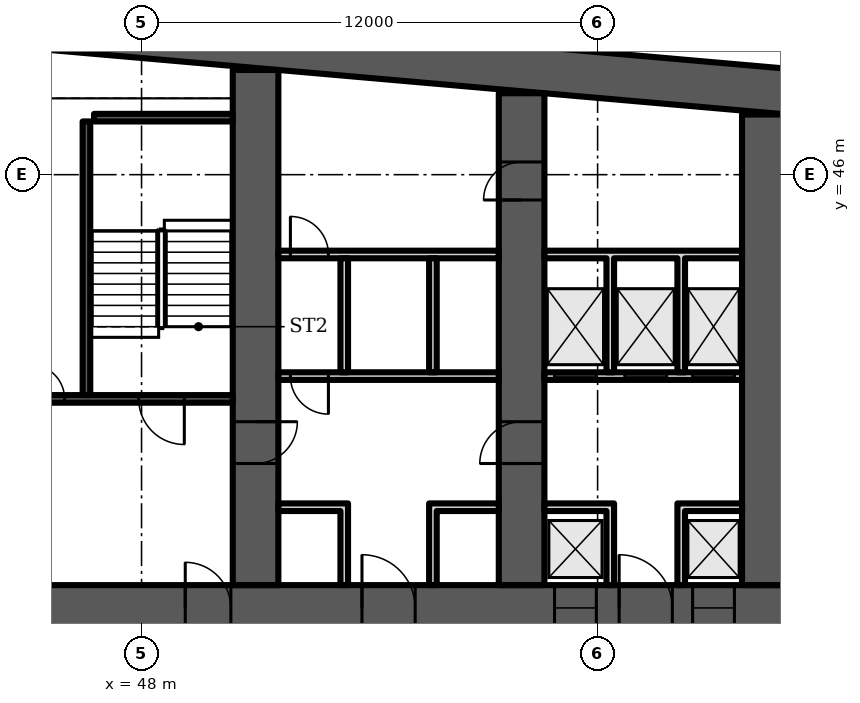
"""IFC4 building model, lengths in metres.
Left out: names, types, materials, properties, quantities, classifications, styles, units other than length and angle.
Written with IfcOpenShell. Run it as: python <this file> out.ifc"""

import sys

from ifc_helpers import new_model, si_unit, direction, frame, frame_2d, origin, place, context, subcontext, project, spatial, polyline, rectangle, outline, extrude, element, fill, save


model = new_model("IFC4")
c1 = context("Model", 3, precision=1e-05, world=origin(), true_north=direction((0.0, 1.0)))
c2 = subcontext(c1, "Body", "Model", "MODEL_VIEW")
j1 = project(units=[si_unit("LENGTHUNIT", "METRE"), si_unit("PLANEANGLEUNIT", "RADIAN")], contexts=[c1])
p1 = place(None, origin())
s1 = spatial("IfcSite", under=j1, at=p1, CompositionType="ELEMENT")
p2 = place(p1, origin())
s2 = spatial("IfcBuilding", under=s1, at=p2, CompositionType="ELEMENT")
p3 = place(p2, frame((0.0, 0.0, 63.1)))
s3 = spatial("IfcBuildingStorey", under=s2, at=p3, CompositionType="ELEMENT", Elevation=63.1)
p4 = place(p3, frame((0.0, 0.0, -0.0)))
e1 = element("IfcWall", 1, at=p4, inside=s3, PredefinedType="SHEAR", context=c2, shape_type="SweptSolid", body=[
    extrude(outline(polyline([(9.0, 47.583), (37.0, 50.032), (65.0, 47.583), (65.0, 48.787), (37.0, 51.237), (9.0, 48.787), (9.0, 47.583)])), origin(), (0.0, 0.0, 1.0), 3.6),
])
p5 = place(p3, frame((9.0, 34.6, 0.0), z_axis=(0.0, 0.0, 1.0), x_axis=(1.0, 0.0, 0.0)))
e2 = element("IfcWall", 2, at=p5, inside=s3, PredefinedType="SHEAR", context=c2, shape_type="SweptSolid", body=[
    extrude(rectangle(XDim=56.0, YDim=1.2, at=frame_2d((28.0, 0.0))), origin(), (0.0, 0.0, 1.0), 3.6),
])
p6 = place(p5, frame((3.3, 0.0, 0.0)))
e3 = element("IfcOpeningElement", 3, at=p6, cuts=e2, PredefinedType="OPENING", context=c2, shape_type="SweptSolid", body=[
    extrude(rectangle(XDim=1.0, YDim=2.1, at=frame_2d((0.5, 1.05))), frame((0.0, 0.61, 0.0), z_axis=(0.0, -1.0, 0.0), x_axis=(1.0, 0.0, 0.0)), (0.0, 0.0, 1.0), 1.22),
])
p7 = place(p5, frame((7.867, 0.0, 0.0)))
e4 = element("IfcOpeningElement", 4, at=p7, cuts=e2, PredefinedType="OPENING", context=c2, shape_type="SweptSolid", body=[
    extrude(rectangle(XDim=1.1, YDim=2.1, at=frame_2d((0.55, 1.05))), frame((0.0, 0.61, 0.0), z_axis=(0.0, -1.0, 0.0), x_axis=(1.0, 0.0, 0.0)), (0.0, 0.0, 1.0), 1.22),
])
p8 = place(p5, frame((12.033, 0.0, 0.0)))
e5 = element("IfcOpeningElement", 5, at=p8, cuts=e2, PredefinedType="OPENING", context=c2, shape_type="SweptSolid", body=[
    extrude(rectangle(XDim=1.1, YDim=2.1, at=frame_2d((0.55, 1.05))), frame((0.0, 0.61, 0.0), z_axis=(0.0, -1.0, 0.0), x_axis=(1.0, 0.0, 0.0)), (0.0, 0.0, 1.0), 1.22),
])
p9 = place(p5, frame((9.8, 0.0, 0.0)))
e6 = element("IfcOpeningElement", 6, at=p9, cuts=e2, PredefinedType="OPENING", context=c2, shape_type="SweptSolid", body=[
    extrude(rectangle(XDim=1.4, YDim=2.1, at=frame_2d((0.7, 1.05))), frame((0.0, 0.61, 0.0), z_axis=(0.0, -1.0, 0.0), x_axis=(1.0, 0.0, 0.0)), (0.0, 0.0, 1.0), 1.22),
])
p10 = place(p5, frame((14.65, 0.0, 0.0)))
e7 = element("IfcOpeningElement", 7, at=p10, cuts=e2, PredefinedType="OPENING", context=c2, shape_type="SweptSolid", body=[
    extrude(rectangle(XDim=1.2, YDim=2.1, at=frame_2d((0.6, 1.05))), frame((0.0, 0.61, 0.0), z_axis=(0.0, -1.0, 0.0), x_axis=(1.0, 0.0, 0.0)), (0.0, 0.0, 1.0), 1.22),
])
p11 = place(p5, frame((21.867, 0.0, 0.0)))
e8 = element("IfcOpeningElement", 8, at=p11, cuts=e2, PredefinedType="OPENING", context=c2, shape_type="SweptSolid", body=[
    extrude(rectangle(XDim=1.1, YDim=2.1, at=frame_2d((0.55, 1.05))), frame((0.0, 0.61, 0.0), z_axis=(0.0, -1.0, 0.0), x_axis=(1.0, 0.0, 0.0)), (0.0, 0.0, 1.0), 1.22),
])
p12 = place(p5, frame((26.033, 0.0, 0.0)))
e9 = element("IfcOpeningElement", 9, at=p12, cuts=e2, PredefinedType="OPENING", context=c2, shape_type="SweptSolid", body=[
    extrude(rectangle(XDim=1.1, YDim=2.1, at=frame_2d((0.55, 1.05))), frame((0.0, 0.61, 0.0), z_axis=(0.0, -1.0, 0.0), x_axis=(1.0, 0.0, 0.0)), (0.0, 0.0, 1.0), 1.22),
])
p13 = place(p5, frame((23.8, 0.0, 0.0)))
e10 = element("IfcOpeningElement", 10, at=p13, cuts=e2, PredefinedType="OPENING", context=c2, shape_type="SweptSolid", body=[
    extrude(rectangle(XDim=1.4, YDim=2.1, at=frame_2d((0.7, 1.05))), frame((0.0, 0.61, 0.0), z_axis=(0.0, -1.0, 0.0), x_axis=(1.0, 0.0, 0.0)), (0.0, 0.0, 1.0), 1.22),
])
p14 = place(p5, frame((28.867, 0.0, 0.0)))
e11 = element("IfcOpeningElement", 11, at=p14, cuts=e2, PredefinedType="OPENING", context=c2, shape_type="SweptSolid", body=[
    extrude(rectangle(XDim=1.1, YDim=2.1, at=frame_2d((0.55, 1.05))), frame((0.0, 0.61, 0.0), z_axis=(0.0, -1.0, 0.0), x_axis=(1.0, 0.0, 0.0)), (0.0, 0.0, 1.0), 1.22),
])
p15 = place(p5, frame((33.033, 0.0, 0.0)))
e12 = element("IfcOpeningElement", 12, at=p15, cuts=e2, PredefinedType="OPENING", context=c2, shape_type="SweptSolid", body=[
    extrude(rectangle(XDim=1.1, YDim=2.1, at=frame_2d((0.55, 1.05))), frame((0.0, 0.61, 0.0), z_axis=(0.0, -1.0, 0.0), x_axis=(1.0, 0.0, 0.0)), (0.0, 0.0, 1.0), 1.22),
])
p16 = place(p5, frame((40.15, 0.0, 0.0)))
e13 = element("IfcOpeningElement", 13, at=p16, cuts=e2, PredefinedType="OPENING", context=c2, shape_type="SweptSolid", body=[
    extrude(rectangle(XDim=1.2, YDim=2.1, at=frame_2d((0.6, 1.05))), frame((0.0, 0.61, 0.0), z_axis=(0.0, -1.0, 0.0), x_axis=(1.0, 0.0, 0.0)), (0.0, 0.0, 1.0), 1.22),
])
p17 = place(p5, frame((44.8, 0.0, 0.0)))
e14 = element("IfcOpeningElement", 14, at=p17, cuts=e2, PredefinedType="OPENING", context=c2, shape_type="SweptSolid", body=[
    extrude(rectangle(XDim=1.4, YDim=2.1, at=frame_2d((0.7, 1.05))), frame((0.0, 0.61, 0.0), z_axis=(0.0, -1.0, 0.0), x_axis=(1.0, 0.0, 0.0)), (0.0, 0.0, 1.0), 1.22),
])
p18 = place(p5, frame((49.867, 0.0, 0.0)))
e15 = element("IfcOpeningElement", 15, at=p18, cuts=e2, PredefinedType="OPENING", context=c2, shape_type="SweptSolid", body=[
    extrude(rectangle(XDim=1.1, YDim=2.1, at=frame_2d((0.55, 1.05))), frame((0.0, 0.61, 0.0), z_axis=(0.0, -1.0, 0.0), x_axis=(1.0, 0.0, 0.0)), (0.0, 0.0, 1.0), 1.22),
])
p19 = place(p5, frame((53.5, 0.0, 0.0)))
e16 = element("IfcOpeningElement", 16, at=p19, cuts=e2, PredefinedType="OPENING", context=c2, shape_type="SweptSolid", body=[
    extrude(rectangle(XDim=1.1, YDim=2.1, at=frame_2d((0.55, 1.05))), frame((0.0, 0.61, 0.0), z_axis=(0.0, -1.0, 0.0), x_axis=(1.0, 0.0, 0.0)), (0.0, 0.0, 1.0), 1.22),
])
p20 = place(p5, frame((51.567, 0.0, 0.0)))
e17 = element("IfcOpeningElement", 17, at=p20, cuts=e2, PredefinedType="OPENING", context=c2, shape_type="SweptSolid", body=[
    extrude(rectangle(XDim=1.4, YDim=2.1, at=frame_2d((0.7, 1.05))), frame((0.0, 0.61, 0.0), z_axis=(0.0, -1.0, 0.0), x_axis=(1.0, 0.0, 0.0)), (0.0, 0.0, 1.0), 1.22),
])
p21 = place(p3, frame((51.0, 35.2, 0.0), z_axis=(0.0, 0.0, 1.0), x_axis=(0.0, 1.0, 0.0)))
e18 = element("IfcWall", 18, at=p21, inside=s3, PredefinedType="SHEAR", context=c2, shape_type="SweptSolid", body=[
    extrude(rectangle(XDim=13.555, YDim=1.2, at=frame_2d((6.778, 0.0))), origin(), (0.0, 0.0, 1.0), 3.6),
])
p22 = place(p21, frame((3.2, 0.0, 0.0)))
e19 = element("IfcOpeningElement", 19, at=p22, cuts=e18, PredefinedType="OPENING", context=c2, shape_type="SweptSolid", body=[
    extrude(rectangle(XDim=1.1, YDim=2.1, at=frame_2d((0.55, 1.05))), frame((0.0, 0.61, 0.0), z_axis=(0.0, -1.0, 0.0), x_axis=(1.0, 0.0, 0.0)), (0.0, 0.0, 1.0), 1.22),
])
p23 = place(p3, frame((58.0, 35.2, 0.0), z_axis=(0.0, 0.0, 1.0), x_axis=(0.0, 1.0, 0.0)))
e20 = element("IfcWall", 20, at=p23, inside=s3, PredefinedType="SHEAR", context=c2, shape_type="SweptSolid", body=[
    extrude(rectangle(XDim=12.943, YDim=1.2, at=frame_2d((6.471, 0.0))), origin(), (0.0, 0.0, 1.0), 3.6),
])
p24 = place(p23, frame((10.134, 0.0, 0.0)))
e21 = element("IfcOpeningElement", 21, at=p24, cuts=e20, PredefinedType="OPENING", context=c2, shape_type="SweptSolid", body=[
    extrude(rectangle(XDim=1.0, YDim=2.1, at=frame_2d((0.5, 1.05))), frame((0.0, 0.61, 0.0), z_axis=(0.0, -1.0, 0.0), x_axis=(1.0, 0.0, 0.0)), (0.0, 0.0, 1.0), 1.22),
])
p25 = place(p23, frame((3.2, 0.0, 0.0)))
e22 = element("IfcOpeningElement", 22, at=p25, cuts=e20, PredefinedType="OPENING", context=c2, shape_type="SweptSolid", body=[
    extrude(rectangle(XDim=1.1, YDim=2.1, at=frame_2d((0.55, 1.05))), frame((0.0, 0.61, 0.0), z_axis=(0.0, -1.0, 0.0), x_axis=(1.0, 0.0, 0.0)), (0.0, 0.0, 1.0), 1.22),
])
p26 = place(p3, frame((64.4, 35.2, 0.0), z_axis=(0.0, 0.0, 1.0), x_axis=(0.0, 1.0, 0.0)))
e23 = element("IfcWall", 23, at=p26, inside=s3, PredefinedType="SHEAR", context=c2, shape_type="SweptSolid", body=[
    extrude(rectangle(XDim=12.383, YDim=1.2, at=frame_2d((6.191, 0.0))), origin(), (0.0, 0.0, 1.0), 3.6),
])
p27 = place(p3, frame((44.6, 40.1, 0.0), z_axis=(0.0, 0.0, 1.0), x_axis=(1.0, 0.0, 0.0)))
e24 = element("IfcWall", 24, at=p27, inside=s3, PredefinedType="SHEAR", context=c2, shape_type="SweptSolid", body=[
    extrude(rectangle(XDim=5.8, YDim=0.2, at=frame_2d((2.9, 0.0))), origin(), (0.0, 0.0, 1.0), 3.2),
])
p28 = place(p27, frame((3.325, 0.0, 0.0)))
e25 = element("IfcOpeningElement", 25, at=p28, cuts=e24, PredefinedType="OPENING", context=c2, shape_type="SweptSolid", body=[
    extrude(rectangle(XDim=1.2, YDim=2.1, at=frame_2d((0.6, 1.05))), frame((0.0, 0.11, 0.0), z_axis=(0.0, -1.0, 0.0), x_axis=(1.0, 0.0, 0.0)), (0.0, 0.0, 1.0), 0.22),
])
p29 = place(p27, frame((0.475, 0.0, 0.0)))
e26 = element("IfcOpeningElement", 26, at=p29, cuts=e24, PredefinedType="OPENING", context=c2, shape_type="SweptSolid", body=[
    extrude(rectangle(XDim=0.9, YDim=2.1, at=frame_2d((0.45, 1.05))), frame((0.0, 0.11, 0.0), z_axis=(0.0, -1.0, 0.0), x_axis=(1.0, 0.0, 0.0)), (0.0, 0.0, 1.0), 0.22),
])
p30 = place(p3, frame((46.55, 40.2, 0.0), z_axis=(0.0, 0.0, 1.0), x_axis=(0.0, 1.0, 0.0)))
e27 = element("IfcWall", 27, at=p30, inside=s3, PredefinedType="SHEAR", context=c2, shape_type="SweptSolid", body=[
    extrude(rectangle(XDim=7.2, YDim=0.2, at=frame_2d((3.6, 0.0))), origin(), (0.0, 0.0, 1.0), 3.2),
])
p31 = place(p3, frame((46.75, 47.5, 0.0), z_axis=(0.0, 0.0, 1.0), x_axis=(1.0, 0.0, 0.0)))
e28 = element("IfcWall", 28, at=p31, inside=s3, PredefinedType="SHEAR", context=c2, shape_type="SweptSolid", body=[
    extrude(rectangle(XDim=3.65, YDim=0.2, at=frame_2d((1.825, 0.0))), origin(), (0.0, 0.0, 1.0), 3.2),
])
p32 = place(p3, frame((51.6, 40.7, 0.0), z_axis=(0.0, 0.0, 1.0), x_axis=(1.0, 0.0, 0.0)))
e29 = element("IfcWall", 29, at=p32, inside=s3, PredefinedType="PARTITIONING", context=c2, shape_type="SweptSolid", body=[
    extrude(rectangle(XDim=5.8, YDim=0.2, at=frame_2d((2.9, 0.0))), origin(), (0.0, 0.0, 1.0), 3.2),
])
p33 = place(p32, frame((0.317, 0.0, 0.0)))
e30 = element("IfcOpeningElement", 30, at=p33, cuts=e29, PredefinedType="OPENING", context=c2, shape_type="SweptSolid", body=[
    extrude(rectangle(XDim=1.0, YDim=2.1, at=frame_2d((0.5, 1.05))), frame((0.0, 0.11, 0.0), z_axis=(0.0, -1.0, 0.0), x_axis=(1.0, 0.0, 0.0)), (0.0, 0.0, 1.0), 0.22),
])
p34 = place(p3, frame((51.6, 43.9, 0.0), z_axis=(0.0, 0.0, 1.0), x_axis=(1.0, 0.0, 0.0)))
e31 = element("IfcWall", 31, at=p34, inside=s3, PredefinedType="PARTITIONING", context=c2, shape_type="SweptSolid", body=[
    extrude(rectangle(XDim=5.8, YDim=0.2, at=frame_2d((2.9, 0.0))), origin(), (0.0, 0.0, 1.0), 3.2),
])
p35 = place(p34, frame((0.317, 0.0, 0.0)))
e32 = element("IfcOpeningElement", 32, at=p35, cuts=e31, PredefinedType="OPENING", context=c2, shape_type="SweptSolid", body=[
    extrude(rectangle(XDim=1.0, YDim=2.1, at=frame_2d((0.5, 1.05))), frame((0.0, 0.11, 0.0), z_axis=(0.0, -1.0, 0.0), x_axis=(1.0, 0.0, 0.0)), (0.0, 0.0, 1.0), 0.22),
])
p36 = place(p3, frame((0.0, 0.0, -0.0)))
e33 = element("IfcWall", 33, at=p36, inside=s3, PredefinedType="PARTITIONING", context=c2, shape_type="SweptSolid", body=[
    extrude(outline(polyline([(53.233, 37.15), (51.6, 37.15), (51.6, 37.35), (53.233, 37.35), (53.433, 37.35), (53.433, 35.2), (53.233, 35.2), (53.233, 37.15)])), origin(), (0.0, 0.0, 1.0), 3.2),
])
p37 = place(p3, frame((0.0, 0.0, -0.0)))
e34 = element("IfcWall", 34, at=p37, inside=s3, PredefinedType="PARTITIONING", context=c2, shape_type="SweptSolid", body=[
    extrude(outline(polyline([(55.567, 37.35), (55.767, 37.35), (57.4, 37.35), (57.4, 37.15), (55.767, 37.15), (55.767, 35.2), (55.567, 35.2), (55.567, 37.35)])), origin(), (0.0, 0.0, 1.0), 3.2),
])
p38 = place(p3, frame((0.0, 0.0, -0.0)))
e35 = element("IfcWall", 35, at=p38, inside=s3, PredefinedType="PARTITIONING", context=c2, shape_type="SweptSolid", body=[
    extrude(outline(polyline([(53.233, 40.8), (53.233, 43.8), (53.433, 43.8), (53.433, 40.8), (53.233, 40.8)])), origin(), (0.0, 0.0, 1.0), 3.2),
])
p39 = place(p3, frame((0.0, 0.0, -0.0)))
e36 = element("IfcWall", 36, at=p39, inside=s3, PredefinedType="PARTITIONING", context=c2, shape_type="SweptSolid", body=[
    extrude(outline(polyline([(55.567, 40.8), (55.567, 43.8), (55.767, 43.8), (55.767, 40.8), (55.567, 40.8)])), origin(), (0.0, 0.0, 1.0), 3.2),
])
p40 = place(p3, frame((58.6, 40.7, 0.0), z_axis=(0.0, 0.0, 1.0), x_axis=(1.0, 0.0, 0.0)))
e37 = element("IfcWall", 37, at=p40, inside=s3, PredefinedType="PARTITIONING", context=c2, shape_type="SweptSolid", body=[
    extrude(rectangle(XDim=5.2, YDim=0.2, at=frame_2d((2.6, 0.0))), origin(), (0.0, 0.0, 1.0), 3.2),
])
p41 = place(p40, frame((0.267, 0.0, 0.0)))
e38 = element("IfcOpeningElement", 38, at=p41, cuts=e37, PredefinedType="OPENING", context=c2, shape_type="SweptSolid", body=[
    extrude(rectangle(XDim=1.1, YDim=2.1, at=frame_2d((0.55, 1.05))), frame((0.0, 0.11, 0.0), z_axis=(0.0, -1.0, 0.0), x_axis=(1.0, 0.0, 0.0)), (0.0, 0.0, 1.0), 0.22),
])
p42 = place(p40, frame((2.117, 0.0, 0.0)))
e39 = element("IfcOpeningElement", 39, at=p42, cuts=e37, PredefinedType="OPENING", context=c2, shape_type="SweptSolid", body=[
    extrude(rectangle(XDim=1.1, YDim=2.1, at=frame_2d((0.55, 1.05))), frame((0.0, 0.11, 0.0), z_axis=(0.0, -1.0, 0.0), x_axis=(1.0, 0.0, 0.0)), (0.0, 0.0, 1.0), 0.22),
])
p43 = place(p40, frame((3.9, 0.0, 0.0)))
e40 = element("IfcOpeningElement", 40, at=p43, cuts=e37, PredefinedType="OPENING", context=c2, shape_type="SweptSolid", body=[
    extrude(rectangle(XDim=1.1, YDim=2.1, at=frame_2d((0.55, 1.05))), frame((0.0, 0.11, 0.0), z_axis=(0.0, -1.0, 0.0), x_axis=(1.0, 0.0, 0.0)), (0.0, 0.0, 1.0), 0.22),
])
p44 = place(p3, frame((0.0, 0.0, -0.0)))
e41 = element("IfcWall", 41, at=p44, inside=s3, PredefinedType="PARTITIONING", context=c2, shape_type="SweptSolid", body=[
    extrude(outline(polyline([(60.233, 37.15), (58.6, 37.15), (58.6, 37.35), (60.233, 37.35), (60.433, 37.35), (60.433, 35.2), (60.233, 35.2), (60.233, 37.15)])), origin(), (0.0, 0.0, 1.0), 3.2),
])
p45 = place(p3, frame((0.0, 0.0, -0.0)))
e42 = element("IfcWall", 42, at=p45, inside=s3, PredefinedType="PARTITIONING", context=c2, shape_type="SweptSolid", body=[
    extrude(outline(polyline([(62.1, 37.35), (62.3, 37.35), (63.8, 37.35), (63.8, 37.15), (62.3, 37.15), (62.3, 35.2), (62.1, 35.2), (62.1, 37.35)])), origin(), (0.0, 0.0, 1.0), 3.2),
])
p46 = place(p3, frame((0.0, 0.0, -0.0)))
e43 = element("IfcWall", 43, at=p46, inside=s3, PredefinedType="PARTITIONING", context=c2, shape_type="SweptSolid", body=[
    extrude(outline(polyline([(60.433, 40.8), (60.233, 40.8), (60.233, 43.8), (58.6, 43.8), (58.6, 44.0), (63.8, 44.0), (63.8, 43.8), (62.3, 43.8), (62.3, 40.8), (62.1, 40.8), (62.1, 43.8), (60.433, 43.8), (60.433, 40.8)])), origin(), (0.0, 0.0, 1.0), 3.2),
])
p47 = place(p28, origin())
e44 = element("IfcDoor", 44, at=p47, inside=s3, OperationType="SINGLE_SWING_RIGHT", PredefinedType="DOOR", context=c2, shape_type="SweptSolid", body=[
    extrude(rectangle(XDim=1.2, YDim=2.1, at=frame_2d((0.6, 1.05))), frame((0.0, 0.025, 0.0), z_axis=(0.0, -1.0, 0.0), x_axis=(1.0, 0.0, 0.0)), (0.0, 0.0, 1.0), 0.05),
])
fill(e25, e44)
p48 = place(p29, origin())
e45 = element("IfcDoor", 45, at=p48, inside=s3, OperationType="SINGLE_SWING_LEFT", PredefinedType="DOOR", context=c2, shape_type="SweptSolid", body=[
    extrude(rectangle(XDim=0.9, YDim=2.1, at=frame_2d((0.45, 1.05))), frame((0.0, 0.025, 0.0), z_axis=(0.0, -1.0, 0.0), x_axis=(1.0, 0.0, 0.0)), (0.0, 0.0, 1.0), 0.05),
])
fill(e26, e45)
p49 = place(p16, origin())
e46 = element("IfcDoor", 46, at=p49, inside=s3, OperationType="SINGLE_SWING_LEFT", PredefinedType="DOOR", context=c2, shape_type="SweptSolid", body=[
    extrude(rectangle(XDim=1.2, YDim=2.1, at=frame_2d((0.6, 1.05))), frame((0.0, 0.025, 0.0), z_axis=(0.0, -1.0, 0.0), x_axis=(1.0, 0.0, 0.0)), (0.0, 0.0, 1.0), 0.05),
])
fill(e13, e46)
p50 = place(p17, origin())
e47 = element("IfcDoor", 47, at=p50, inside=s3, OperationType="DOUBLE_DOOR_SINGLE_SWING", PredefinedType="DOOR", context=c2, shape_type="SweptSolid", body=[
    extrude(rectangle(XDim=1.4, YDim=2.1, at=frame_2d((0.7, 1.05))), frame((0.0, 0.025, 0.0), z_axis=(0.0, -1.0, 0.0), x_axis=(1.0, 0.0, 0.0)), (0.0, 0.0, 1.0), 0.05),
])
fill(e14, e47)
p51 = place(p33, origin())
e48 = element("IfcDoor", 48, at=p51, inside=s3, OperationType="SINGLE_SWING_RIGHT", PredefinedType="DOOR", context=c2, shape_type="SweptSolid", body=[
    extrude(rectangle(XDim=1.0, YDim=2.1, at=frame_2d((0.5, 1.05))), frame((0.0, 0.025, 0.0), z_axis=(0.0, -1.0, 0.0), x_axis=(1.0, 0.0, 0.0)), (0.0, 0.0, 1.0), 0.05),
])
fill(e30, e48)
p52 = place(p35, origin())
e49 = element("IfcDoor", 49, at=p52, inside=s3, OperationType="SINGLE_SWING_LEFT", PredefinedType="DOOR", context=c2, shape_type="SweptSolid", body=[
    extrude(rectangle(XDim=1.0, YDim=2.1, at=frame_2d((0.5, 1.05))), frame((0.0, 0.025, 0.0), z_axis=(0.0, -1.0, 0.0), x_axis=(1.0, 0.0, 0.0)), (0.0, 0.0, 1.0), 0.05),
])
fill(e32, e49)
p53 = place(p18, origin())
e50 = element("IfcDoor", 50, at=p53, inside=s3, OperationType="DOUBLE_DOOR_SLIDING", PredefinedType="DOOR", context=c2, shape_type="SweptSolid", body=[
    extrude(rectangle(XDim=1.1, YDim=2.1, at=frame_2d((0.55, 1.05))), frame((0.0, 0.025, 0.0), z_axis=(0.0, -1.0, 0.0), x_axis=(1.0, 0.0, 0.0)), (0.0, 0.0, 1.0), 0.05),
])
fill(e15, e50)
p54 = place(p19, origin())
e51 = element("IfcDoor", 51, at=p54, inside=s3, OperationType="DOUBLE_DOOR_SLIDING", PredefinedType="DOOR", context=c2, shape_type="SweptSolid", body=[
    extrude(rectangle(XDim=1.1, YDim=2.1, at=frame_2d((0.55, 1.05))), frame((0.0, 0.025, 0.0), z_axis=(0.0, -1.0, 0.0), x_axis=(1.0, 0.0, 0.0)), (0.0, 0.0, 1.0), 0.05),
])
fill(e16, e51)
p55 = place(p20, origin())
e52 = element("IfcDoor", 52, at=p55, inside=s3, OperationType="DOUBLE_DOOR_SINGLE_SWING", PredefinedType="DOOR", context=c2, shape_type="SweptSolid", body=[
    extrude(rectangle(XDim=1.4, YDim=2.1, at=frame_2d((0.7, 1.05))), frame((0.0, 0.025, 0.0), z_axis=(0.0, -1.0, 0.0), x_axis=(1.0, 0.0, 0.0)), (0.0, 0.0, 1.0), 0.05),
])
fill(e17, e52)
p56 = place(p41, origin())
e53 = element("IfcDoor", 53, at=p56, inside=s3, OperationType="DOUBLE_DOOR_SLIDING", PredefinedType="DOOR", context=c2, shape_type="SweptSolid", body=[
    extrude(rectangle(XDim=1.1, YDim=2.1, at=frame_2d((0.55, 1.05))), frame((0.0, 0.025, 0.0), z_axis=(0.0, -1.0, 0.0), x_axis=(1.0, 0.0, 0.0)), (0.0, 0.0, 1.0), 0.05),
])
fill(e38, e53)
p57 = place(p42, origin())
e54 = element("IfcDoor", 54, at=p57, inside=s3, OperationType="DOUBLE_DOOR_SLIDING", PredefinedType="DOOR", context=c2, shape_type="SweptSolid", body=[
    extrude(rectangle(XDim=1.1, YDim=2.1, at=frame_2d((0.55, 1.05))), frame((0.0, 0.025, 0.0), z_axis=(0.0, -1.0, 0.0), x_axis=(1.0, 0.0, 0.0)), (0.0, 0.0, 1.0), 0.05),
])
fill(e39, e54)
p58 = place(p43, origin())
e55 = element("IfcDoor", 55, at=p58, inside=s3, OperationType="DOUBLE_DOOR_SLIDING", PredefinedType="DOOR", context=c2, shape_type="SweptSolid", body=[
    extrude(rectangle(XDim=1.1, YDim=2.1, at=frame_2d((0.55, 1.05))), frame((0.0, 0.025, 0.0), z_axis=(0.0, -1.0, 0.0), x_axis=(1.0, 0.0, 0.0)), (0.0, 0.0, 1.0), 0.05),
])
fill(e40, e55)
p59 = place(p24, origin())
e56 = element("IfcDoor", 56, at=p59, inside=s3, OperationType="SINGLE_SWING_LEFT", PredefinedType="DOOR", context=c2, shape_type="SweptSolid", body=[
    extrude(rectangle(XDim=1.0, YDim=2.1, at=frame_2d((0.5, 1.05))), frame((0.0, 0.6, 0.0), z_axis=(0.0, -1.0, 0.0), x_axis=(1.0, 0.0, 0.0)), (0.0, 0.0, 1.0), 1.199),
])
fill(e21, e56)
p60 = place(p22, origin())
e57 = element("IfcDoor", 57, at=p60, inside=s3, OperationType="SINGLE_SWING_RIGHT", PredefinedType="DOOR", context=c2, shape_type="SweptSolid", body=[
    extrude(rectangle(XDim=1.1, YDim=2.1, at=frame_2d((0.55, 1.05))), frame((0.0, 0.025, 0.0), z_axis=(0.0, -1.0, 0.0), x_axis=(1.0, 0.0, 0.0)), (0.0, 0.0, 1.0), 0.05),
])
fill(e19, e57)
p61 = place(p25, origin())
e58 = element("IfcDoor", 58, at=p61, inside=s3, OperationType="SINGLE_SWING_LEFT", PredefinedType="DOOR", context=c2, shape_type="SweptSolid", body=[
    extrude(rectangle(XDim=1.1, YDim=2.1, at=frame_2d((0.55, 1.05))), frame((0.0, 0.025, 0.0), z_axis=(0.0, -1.0, 0.0), x_axis=(1.0, 0.0, 0.0)), (0.0, 0.0, 1.0), 0.05),
])
fill(e22, e58)
save(model, sys.argv[1])
